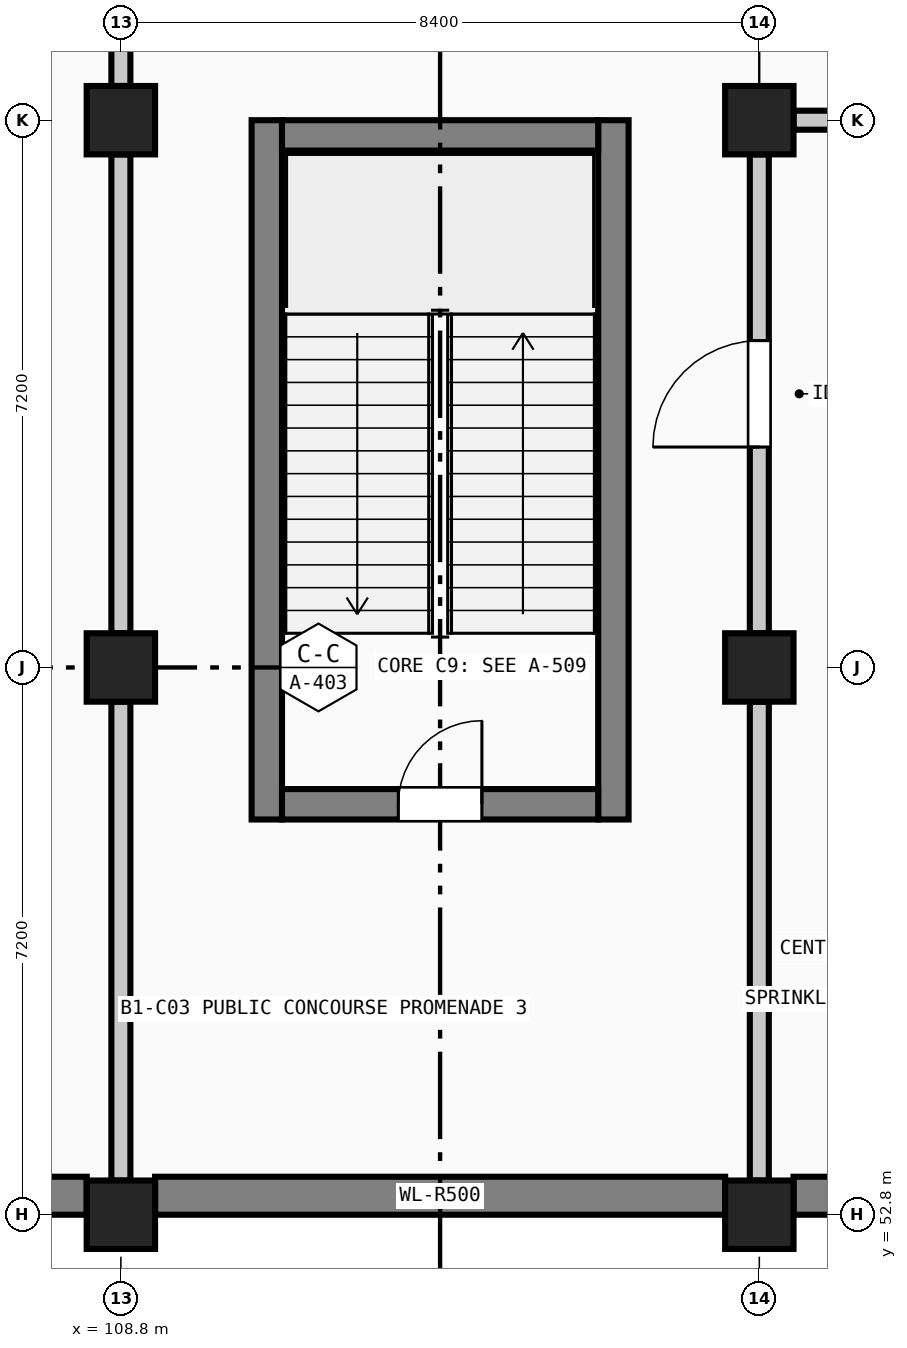
"""IFC4 building model, lengths in metres.
Left out: names, types, materials, properties, quantities, classifications, styles, units other than length and angle.
Written with IfcOpenShell. Run it as: python <this file> out.ifc"""

import sys

from ifc_helpers import new_model, si_unit, direction, frame, frame_2d, origin, origin_2d, place, context, subcontext, project, spatial, rectangle, extrude, element, fill, save


model = new_model("IFC4")
c1 = context("Model", 3, precision=1e-05, world=origin(), true_north=direction((0.0, 1.0)))
c2 = subcontext(c1, "Body", "Model", "MODEL_VIEW")
j1 = project(units=[si_unit("LENGTHUNIT", "METRE"), si_unit("PLANEANGLEUNIT", "RADIAN")], contexts=[c1])
p1 = place(None, origin())
s1 = spatial("IfcSite", under=j1, at=p1, CompositionType="ELEMENT")
p2 = place(p1, origin())
s2 = spatial("IfcBuilding", under=s1, at=p2, CompositionType="ELEMENT")
p3 = place(p2, frame((0.0, 0.0, -4.8)))
s3 = spatial("IfcBuildingStorey", under=s2, at=p3, CompositionType="ELEMENT", Elevation=-4.8)
for number, where, z_axis, x_axis in (
    (1, (108.8, 52.8, 0.0), (0.0, 0.0, 1.0), (1.0, 0.0, 0.0)),
    (2, (108.8, 60.0, 0.0), (0.0, 0.0, 1.0), (1.0, 0.0, 0.0)),
    (3, (108.8, 67.2, 0.0), (0.0, 0.0, 1.0), (1.0, 0.0, 0.0)),
    (4, (117.2, 52.8, 0.0), (0.0, 0.0, 1.0), (1.0, 0.0, 0.0)),
    (5, (117.2, 60.0, 0.0), (0.0, 0.0, 1.0), (1.0, 0.0, 0.0)),
    (6, (117.2, 67.2, 0.0), (0.0, 0.0, 1.0), (1.0, 0.0, 0.0)),
):
    element("IfcColumn", number, at=place(p3, frame(where, z_axis=z_axis, x_axis=x_axis)), inside=s3, PredefinedType="COLUMN", context=c2, shape_type="SweptSolid", body=[
        extrude(rectangle(XDim=0.9, YDim=0.9, at=origin_2d()), origin(), (0.0, 0.0, 1.0), 4.8),
    ])
for number, where, z_axis, x_axis in (
    (7, (110.72, 58.0, 0.0), (0.0, 0.0, 1.0), (0.0, 1.0, 0.0)),
    (8, (115.28, 67.2, 0.0), (0.0, 0.0, 1.0), (0.0, -1.0, 0.0)),
):
    element("IfcWall", number, at=place(p3, frame(where, z_axis=z_axis, x_axis=x_axis)), inside=s3, PredefinedType="SHEAR", context=c2, shape_type="SweptSolid", body=[
        extrude(rectangle(XDim=9.2, YDim=0.4, at=frame_2d((4.6, 0.0))), origin(), (0.0, 0.0, 1.0), 4.575),
    ])
p4 = place(p3, frame((115.08, 58.2, 0.0), z_axis=(0.0, 0.0, 1.0), x_axis=(-1.0, 0.0, 0.0)))
e9 = element("IfcWall", 9, at=p4, inside=s3, PredefinedType="SHEAR", context=c2, shape_type="SweptSolid", body=[
    extrude(rectangle(XDim=4.16, YDim=0.4, at=frame_2d((2.08, 0.0))), origin(), (0.0, 0.0, 1.0), 4.575),
])
p5 = place(p4, frame((1.53, 0.0, 0.0)))
e10 = element("IfcOpeningElement", 10, at=p5, cuts=e9, PredefinedType="OPENING", context=c2, shape_type="SweptSolid", body=[
    extrude(rectangle(XDim=1.1, YDim=2.2, at=frame_2d((0.55, 1.1))), frame((0.0, 0.21, 0.0), z_axis=(0.0, -1.0, 0.0), x_axis=(1.0, 0.0, 0.0)), (0.0, 0.0, 1.0), 0.42),
])
p6 = place(p3, frame((110.92, 67.0, 0.0), z_axis=(0.0, 0.0, 1.0), x_axis=(1.0, 0.0, 0.0)))
e11 = element("IfcWall", 11, at=p6, inside=s3, PredefinedType="SHEAR", context=c2, shape_type="SweptSolid", body=[
    extrude(rectangle(XDim=4.16, YDim=0.4, at=frame_2d((2.08, 0.0))), origin(), (0.0, 0.0, 1.0), 4.575),
])
for number, where, z_axis, x_axis in (
    (12, (125.15, 53.05, 0.0), (0.0, 0.0, 1.0), (-1.0, 0.0, 0.0)),
    (13, (116.75, 53.05, 0.0), (0.0, 0.0, 1.0), (-1.0, 0.0, 0.0)),
    (14, (108.35, 53.05, 0.0), (0.0, 0.0, 1.0), (-1.0, 0.0, 0.0)),
):
    element("IfcWall", number, at=place(p3, frame(where, z_axis=z_axis, x_axis=x_axis)), inside=s3, PredefinedType="USERDEFINED", context=c2, shape_type="SweptSolid", body=[
        extrude(rectangle(XDim=7.5, YDim=0.5, at=frame_2d((3.75, 0.0))), origin(), (0.0, 0.0, 1.0), 4.5),
    ])
p7 = place(p3, frame((117.2, 53.25, 0.0), z_axis=(0.0, 0.0, 1.0), x_axis=(0.0, 1.0, 0.0)))
e15 = element("IfcWall", 15, at=p7, inside=s3, PredefinedType="SOLIDWALL", context=c2, shape_type="SweptSolid", body=[
    extrude(rectangle(XDim=6.3, YDim=0.25, at=frame_2d((3.15, 0.0))), origin(), (0.0, 0.0, 1.0), 4.2),
])
p8 = place(p3, frame((117.2, 60.45, 0.0), z_axis=(0.0, 0.0, 1.0), x_axis=(0.0, 1.0, 0.0)))
e16 = element("IfcWall", 16, at=p8, inside=s3, PredefinedType="SOLIDWALL", context=c2, shape_type="SweptSolid", body=[
    extrude(rectangle(XDim=6.3, YDim=0.25, at=frame_2d((3.15, 0.0))), origin(), (0.0, 0.0, 1.0), 4.2),
])
p9 = place(p8, frame((2.45, 0.0, 0.0)))
e17 = element("IfcOpeningElement", 17, at=p9, cuts=e16, PredefinedType="OPENING", context=c2, shape_type="SweptSolid", body=[
    extrude(rectangle(XDim=1.4, YDim=2.2, at=frame_2d((0.7, 1.1))), frame((0.0, 0.135, 0.0), z_axis=(0.0, -1.0, 0.0), x_axis=(1.0, 0.0, 0.0)), (0.0, 0.0, 1.0), 0.27),
])
for number, where, z_axis, x_axis in (
    (18, (108.8, 73.95, 0.0), (0.0, 0.0, 1.0), (0.0, -1.0, 0.0)),
    (19, (108.8, 66.75, 0.0), (0.0, 0.0, 1.0), (0.0, -1.0, 0.0)),
    (20, (108.8, 59.55, 0.0), (0.0, 0.0, 1.0), (0.0, -1.0, 0.0)),
):
    element("IfcWall", number, at=place(p3, frame(where, z_axis=z_axis, x_axis=x_axis)), inside=s3, PredefinedType="SOLIDWALL", context=c2, shape_type="SweptSolid", body=[
        extrude(rectangle(XDim=6.3, YDim=0.25, at=frame_2d((3.15, 0.0))), origin(), (0.0, 0.0, 1.0), 4.05),
    ])
p10 = place(p3, frame((125.15, 67.2, 0.0), z_axis=(0.0, 0.0, 1.0), x_axis=(-1.0, 0.0, 0.0)))
e21 = element("IfcWall", 21, at=p10, inside=s3, PredefinedType="SOLIDWALL", context=c2, shape_type="SweptSolid", body=[
    extrude(rectangle(XDim=7.5, YDim=0.25, at=frame_2d((3.75, 0.0))), origin(), (0.0, 0.0, 1.0), 4.5),
])
p11 = place(p5, frame((1.1, 0.0, 0.0), z_axis=(0.0, 0.0, 1.0), x_axis=(-1.0, 0.0, 0.0)))
e22 = element("IfcDoor", 22, at=p11, inside=s3, OperationType="SINGLE_SWING_RIGHT", PredefinedType="DOOR", context=c2, shape_type="SweptSolid", body=[
    extrude(rectangle(XDim=1.1, YDim=2.2, at=frame_2d((0.55, 1.1))), frame((0.0, 0.025, 0.0), z_axis=(0.0, -1.0, 0.0), x_axis=(1.0, 0.0, 0.0)), (0.0, 0.0, 1.0), 0.05),
])
fill(e10, e22)
p12 = place(p9, origin())
e23 = element("IfcDoor", 23, at=p12, inside=s3, OperationType="SINGLE_SWING_LEFT", PredefinedType="DOOR", context=c2, shape_type="SweptSolid", body=[
    extrude(rectangle(XDim=1.4, YDim=2.2, at=frame_2d((0.7, 1.1))), frame((0.0, 0.025, 0.0), z_axis=(0.0, -1.0, 0.0), x_axis=(1.0, 0.0, 0.0)), (0.0, 0.0, 1.0), 0.05),
])
fill(e17, e23)
save(model, sys.argv[1])
